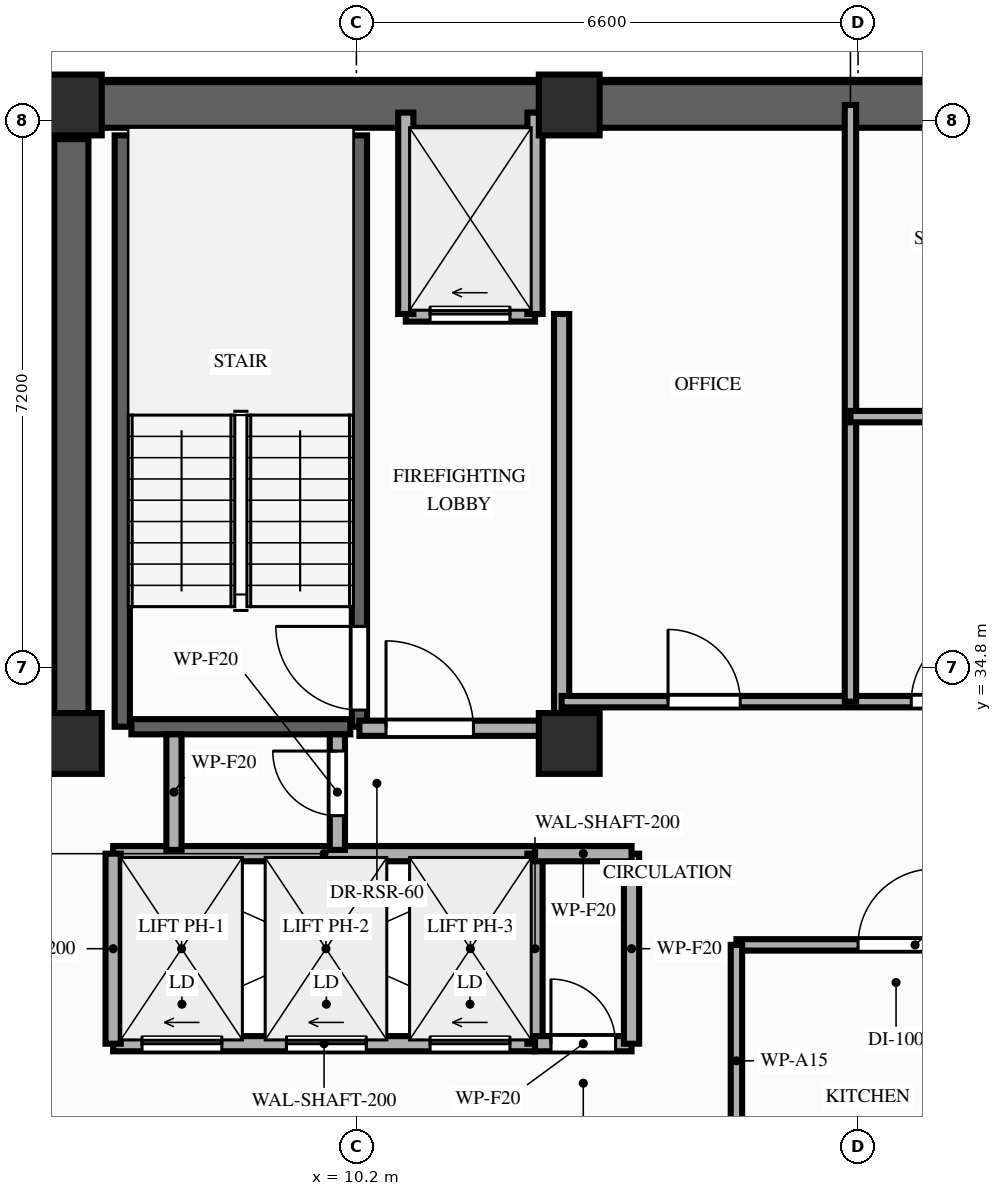
"""IFC4 building model, lengths in metres.
Left out: names, types, materials, properties, quantities, classifications, styles, units other than length and angle.
Written with IfcOpenShell. Run it as: python <this file> out.ifc"""

import sys

from ifc_helpers import new_model, si_unit, direction, frame, frame_2d, origin, origin_2d, place, context, subcontext, project, spatial, rectangle, extrude, element, fill, save


model = new_model("IFC4")
c1 = context("Model", 3, precision=1e-05, world=origin(), true_north=direction((0.0, 1.0)))
c2 = subcontext(c1, "Body", "Model", "MODEL_VIEW")
j1 = project(units=[si_unit("LENGTHUNIT", "METRE"), si_unit("PLANEANGLEUNIT", "RADIAN")], contexts=[c1])
p1 = place(None, origin())
s1 = spatial("IfcSite", under=j1, at=p1, CompositionType="ELEMENT")
p2 = place(p1, origin())
s2 = spatial("IfcBuilding", under=s1, at=p2, CompositionType="ELEMENT")
p3 = place(p2, frame((0.0, 0.0, 218.4)))
s3 = spatial("IfcBuildingStorey", under=s2, at=p3, CompositionType="ELEMENT", Elevation=218.4)
for number, where, z_axis, x_axis in (
    (1, (6.45, 33.8, 0.0), (0.0, 0.0, 1.0), (1.0, 0.0, 0.0)),
    (2, (13.0, 33.8, 0.0), (0.0, 0.0, 1.0), (1.0, 0.0, 0.0)),
    (3, (6.45, 42.2, 0.0), (0.0, 0.0, 1.0), (1.0, 0.0, 0.0)),
    (4, (13.0, 42.2, 0.0), (0.0, 0.0, 1.0), (1.0, 0.0, 0.0)),
):
    element("IfcColumn", number, at=place(p3, frame(where, z_axis=z_axis, x_axis=x_axis)), inside=s3, PredefinedType="COLUMN", context=c2, shape_type="SweptSolid", body=[
        extrude(rectangle(XDim=0.8, YDim=0.8, at=origin_2d()), origin(), (0.0, 0.0, 1.0), 3.2),
    ])
p4 = place(p3, frame((6.45, 42.2, 0.0), z_axis=(0.0, 0.0, 1.0), x_axis=(1.0, 0.0, 0.0)))
e5 = element("IfcWall", 5, at=p4, inside=s3, PredefinedType="SHEAR", context=c2, shape_type="SweptSolid", body=[
    extrude(rectangle(XDim=20.45, YDim=0.6, at=frame_2d((10.225, 0.0))), origin(), (0.0, 0.0, 1.0), 3.02),
])
p5 = place(p3, frame((6.45, 33.8, 0.0), z_axis=(0.0, 0.0, 1.0), x_axis=(0.0, 1.0, 0.0)))
e6 = element("IfcWall", 6, at=p5, inside=s3, PredefinedType="SHEAR", context=c2, shape_type="SweptSolid", body=[
    extrude(rectangle(XDim=7.95, YDim=0.45, at=frame_2d((3.975, 0.0))), origin(), (0.0, 0.0, 1.0), 3.02),
])
p6 = place(p3, frame((7.12, 34.02, 0.0), z_axis=(0.0, 0.0, 1.0), x_axis=(0.0, 1.0, 0.0)))
e7 = element("IfcWall", 7, at=p6, inside=s3, PredefinedType="SHEAR", context=c2, shape_type="SweptSolid", body=[
    extrude(rectangle(XDim=7.78, YDim=0.2, at=frame_2d((3.89, 0.0))), origin(), (0.0, 0.0, 1.0), 3.02),
])
p7 = place(p3, frame((10.24, 34.02, 0.0), z_axis=(0.0, 0.0, 1.0), x_axis=(0.0, 1.0, 0.0)))
e8 = element("IfcWall", 8, at=p7, inside=s3, PredefinedType="SHEAR", context=c2, shape_type="SweptSolid", body=[
    extrude(rectangle(XDim=7.78, YDim=0.2, at=frame_2d((3.89, 0.0))), origin(), (0.0, 0.0, 1.0), 3.02),
])
p8 = place(p7, frame((0.22, 0.0, 0.0)))
e9 = element("IfcOpeningElement", 9, at=p8, cuts=e8, PredefinedType="OPENING", context=c2, shape_type="SweptSolid", body=[
    extrude(rectangle(XDim=1.1, YDim=2.15, at=frame_2d((0.55, 1.075))), frame((0.0, 0.11, 0.0), z_axis=(0.0, -1.0, 0.0), x_axis=(1.0, 0.0, 0.0)), (0.0, 0.0, 1.0), 0.22),
])
p9 = place(p3, frame((7.24, 34.02, 0.0), z_axis=(0.0, 0.0, 1.0), x_axis=(1.0, 0.0, 0.0)))
e10 = element("IfcWall", 10, at=p9, inside=s3, PredefinedType="SHEAR", context=c2, shape_type="SweptSolid", body=[
    extrude(rectangle(XDim=2.88, YDim=0.2, at=frame_2d((1.44, 0.0))), origin(), (0.0, 0.0, 1.0), 3.02),
])
p10 = place(p3, frame((7.0, 29.85, 0.0), z_axis=(0.0, 0.0, 1.0), x_axis=(1.0, 0.0, 0.0)))
e11 = element("IfcWall", 11, at=p10, inside=s3, PredefinedType="MOVABLE", context=c2, shape_type="SweptSolid", body=[
    extrude(rectangle(XDim=5.55, YDim=0.2, at=frame_2d((2.775, 0.0))), origin(), (0.0, 0.0, 1.0), 3.02),
])
p11 = place(p10, frame((0.38, 0.0, 0.0)))
e12 = element("IfcOpeningElement", 12, at=p11, cuts=e11, PredefinedType="OPENING", context=c2, shape_type="SweptSolid", body=[
    extrude(rectangle(XDim=1.05, YDim=2.15, at=frame_2d((0.525, 1.075))), frame((0.0, 0.11, 0.0), z_axis=(0.0, -1.0, 0.0), x_axis=(1.0, 0.0, 0.0)), (0.0, 0.0, 1.0), 0.22),
])
p12 = place(p10, frame((2.28, 0.0, 0.0)))
e13 = element("IfcOpeningElement", 13, at=p12, cuts=e11, PredefinedType="OPENING", context=c2, shape_type="SweptSolid", body=[
    extrude(rectangle(XDim=1.05, YDim=2.15, at=frame_2d((0.525, 1.075))), frame((0.0, 0.11, 0.0), z_axis=(0.0, -1.0, 0.0), x_axis=(1.0, 0.0, 0.0)), (0.0, 0.0, 1.0), 0.22),
])
p13 = place(p10, frame((4.17, 0.0, 0.0)))
e14 = element("IfcOpeningElement", 14, at=p13, cuts=e11, PredefinedType="OPENING", context=c2, shape_type="SweptSolid", body=[
    extrude(rectangle(XDim=1.05, YDim=2.15, at=frame_2d((0.525, 1.075))), frame((0.0, 0.11, 0.0), z_axis=(0.0, -1.0, 0.0), x_axis=(1.0, 0.0, 0.0)), (0.0, 0.0, 1.0), 0.22),
])
p14 = place(p3, frame((7.0, 32.35, 0.0), z_axis=(0.0, 0.0, 1.0), x_axis=(1.0, 0.0, 0.0)))
e15 = element("IfcWall", 15, at=p14, inside=s3, PredefinedType="MOVABLE", context=c2, shape_type="SweptSolid", body=[
    extrude(rectangle(XDim=5.55, YDim=0.2, at=frame_2d((2.775, 0.0))), origin(), (0.0, 0.0, 1.0), 3.02),
])
for number, where, z_axis, x_axis in (
    (16, (7.0, 29.85, 0.0), (0.0, 0.0, 1.0), (0.0, 1.0, 0.0)),
    (17, (12.55, 29.85, 0.0), (0.0, 0.0, 1.0), (0.0, 1.0, 0.0)),
):
    element("IfcWall", number, at=place(p3, frame(where, z_axis=z_axis, x_axis=x_axis)), inside=s3, PredefinedType="MOVABLE", context=c2, shape_type="SweptSolid", body=[
        extrude(rectangle(XDim=2.5, YDim=0.2, at=frame_2d((1.25, 0.0))), origin(), (0.0, 0.0, 1.0), 3.02),
    ])
p15 = place(p3, frame((10.85, 39.45, 0.0), z_axis=(0.0, 0.0, 1.0), x_axis=(1.0, 0.0, 0.0)))
e18 = element("IfcWall", 18, at=p15, inside=s3, PredefinedType="MOVABLE", context=c2, shape_type="SweptSolid", body=[
    extrude(rectangle(XDim=1.7, YDim=0.2, at=frame_2d((0.85, 0.0))), origin(), (0.0, 0.0, 1.0), 3.02),
])
p16 = place(p15, frame((0.32, 0.0, 0.0)))
e19 = element("IfcOpeningElement", 19, at=p16, cuts=e18, PredefinedType="OPENING", context=c2, shape_type="SweptSolid", body=[
    extrude(rectangle(XDim=1.05, YDim=2.15, at=frame_2d((0.525, 1.075))), frame((0.0, 0.11, 0.0), z_axis=(0.0, -1.0, 0.0), x_axis=(1.0, 0.0, 0.0)), (0.0, 0.0, 1.0), 0.22),
])
for number, where, z_axis, x_axis in (
    (20, (10.85, 39.45, 0.0), (0.0, 0.0, 1.0), (0.0, 1.0, 0.0)),
    (21, (12.55, 39.45, 0.0), (0.0, 0.0, 1.0), (0.0, 1.0, 0.0)),
):
    element("IfcWall", number, at=place(p3, frame(where, z_axis=z_axis, x_axis=x_axis)), inside=s3, PredefinedType="MOVABLE", context=c2, shape_type="SweptSolid", body=[
        extrude(rectangle(XDim=2.65, YDim=0.2, at=frame_2d((1.325, 0.0))), origin(), (0.0, 0.0, 1.0), 2.51),
    ])
p17 = place(p3, frame((12.9, 34.0, 0.0), z_axis=(0.0, 0.0, 1.0), x_axis=(0.0, 1.0, 0.0)))
e22 = element("IfcWall", 22, at=p17, inside=s3, PredefinedType="PARTITIONING", context=c2, shape_type="SweptSolid", body=[
    extrude(rectangle(XDim=5.45, YDim=0.2, at=frame_2d((2.725, 0.0))), origin(), (0.0, 0.0, 1.0), 2.51),
])
p18 = place(p3, frame((10.24, 34.0, 0.0), z_axis=(0.0, 0.0, 1.0), x_axis=(1.0, 0.0, 0.0)))
e23 = element("IfcWall", 23, at=p18, inside=s3, PredefinedType="PARTITIONING", context=c2, shape_type="SweptSolid", body=[
    extrude(rectangle(XDim=2.66, YDim=0.2, at=frame_2d((1.33, 0.0))), origin(), (0.0, 0.0, 1.0), 2.51),
])
p19 = place(p18, frame((0.35, 0.0, 0.0)))
e24 = element("IfcOpeningElement", 24, at=p19, cuts=e23, PredefinedType="OPENING", context=c2, shape_type="SweptSolid", body=[
    extrude(rectangle(XDim=1.15, YDim=2.15, at=frame_2d((0.575, 1.075))), frame((0.0, 0.11, 0.0), z_axis=(0.0, -1.0, 0.0), x_axis=(1.0, 0.0, 0.0)), (0.0, 0.0, 1.0), 0.22),
])
p20 = place(p3, frame((12.55, 29.85, 0.0), z_axis=(0.0, 0.0, 1.0), x_axis=(1.0, 0.0, 0.0)))
e25 = element("IfcWall", 25, at=p20, inside=s3, PredefinedType="PARTITIONING", context=c2, shape_type="SweptSolid", body=[
    extrude(rectangle(XDim=1.27, YDim=0.2, at=frame_2d((0.635, 0.0))), origin(), (0.0, 0.0, 1.0), 3.02),
])
p21 = place(p20, frame((0.21, 0.0, 0.0)))
e26 = element("IfcOpeningElement", 26, at=p21, cuts=e25, PredefinedType="OPENING", context=c2, shape_type="SweptSolid", body=[
    extrude(rectangle(XDim=0.85, YDim=2.05, at=frame_2d((0.425, 1.025))), frame((0.0, 0.11, 0.0), z_axis=(0.0, -1.0, 0.0), x_axis=(1.0, 0.0, 0.0)), (0.0, 0.0, 1.0), 0.22),
])
p22 = place(p3, frame((13.82, 29.85, 0.0), z_axis=(0.0, 0.0, 1.0), x_axis=(0.0, 1.0, 0.0)))
e27 = element("IfcWall", 27, at=p22, inside=s3, PredefinedType="PARTITIONING", context=c2, shape_type="SweptSolid", body=[
    extrude(rectangle(XDim=2.5, YDim=0.2, at=frame_2d((1.25, 0.0))), origin(), (0.0, 0.0, 1.0), 3.02),
])
p23 = place(p3, frame((12.55, 32.35, 0.0), z_axis=(0.0, 0.0, 1.0), x_axis=(1.0, 0.0, 0.0)))
e28 = element("IfcWall", 28, at=p23, inside=s3, PredefinedType="PARTITIONING", context=c2, shape_type="SweptSolid", body=[
    extrude(rectangle(XDim=1.27, YDim=0.2, at=frame_2d((0.635, 0.0))), origin(), (0.0, 0.0, 1.0), 3.02),
])
p24 = place(p3, frame((7.8, 32.4, 0.0), z_axis=(0.0, 0.0, 1.0), x_axis=(0.0, 1.0, 0.0)))
e29 = element("IfcWall", 29, at=p24, inside=s3, PredefinedType="PARTITIONING", context=c2, shape_type="SweptSolid", body=[
    extrude(rectangle(XDim=1.52, YDim=0.2, at=frame_2d((0.76, 0.0))), origin(), (0.0, 0.0, 1.0), 2.51),
])
p25 = place(p3, frame((9.95, 32.4, 0.0), z_axis=(0.0, 0.0, 1.0), x_axis=(0.0, 1.0, 0.0)))
e30 = element("IfcWall", 30, at=p25, inside=s3, PredefinedType="PARTITIONING", context=c2, shape_type="SweptSolid", body=[
    extrude(rectangle(XDim=1.52, YDim=0.2, at=frame_2d((0.76, 0.0))), origin(), (0.0, 0.0, 1.0), 2.51),
])
p26 = place(p25, frame((0.45, 0.0, 0.0)))
e31 = element("IfcOpeningElement", 31, at=p26, cuts=e30, PredefinedType="OPENING", context=c2, shape_type="SweptSolid", body=[
    extrude(rectangle(XDim=0.85, YDim=2.05, at=frame_2d((0.425, 1.025))), frame((0.0, 0.11, 0.0), z_axis=(0.0, -1.0, 0.0), x_axis=(1.0, 0.0, 0.0)), (0.0, 0.0, 1.0), 0.22),
])
p27 = place(p3, frame((12.9, 34.35, 0.0), z_axis=(0.0, 0.0, 1.0), x_axis=(1.0, 0.0, 0.0)))
e32 = element("IfcWall", 32, at=p27, inside=s3, PredefinedType="PARTITIONING", context=c2, shape_type="SweptSolid", body=[
    extrude(rectangle(XDim=7.6, YDim=0.15, at=frame_2d((3.8, 0.0))), origin(), (0.0, 0.0, 1.0), 3.02),
])
p28 = place(p27, frame((1.4, 0.0, 0.0)))
e33 = element("IfcOpeningElement", 33, at=p28, cuts=e32, PredefinedType="OPENING", context=c2, shape_type="SweptSolid", body=[
    extrude(rectangle(XDim=0.95, YDim=2.15, at=frame_2d((0.475, 1.075))), frame((0.0, 0.085, 0.0), z_axis=(0.0, -1.0, 0.0), x_axis=(1.0, 0.0, 0.0)), (0.0, 0.0, 1.0), 0.17),
])
p29 = place(p27, frame((4.6, 0.0, 0.0)))
e34 = element("IfcOpeningElement", 34, at=p29, cuts=e32, PredefinedType="OPENING", context=c2, shape_type="SweptSolid", body=[
    extrude(rectangle(XDim=0.95, YDim=2.15, at=frame_2d((0.475, 1.075))), frame((0.0, 0.085, 0.0), z_axis=(0.0, -1.0, 0.0), x_axis=(1.0, 0.0, 0.0)), (0.0, 0.0, 1.0), 0.17),
])
p30 = place(p3, frame((16.7, 34.35, 0.0), z_axis=(0.0, 0.0, 1.0), x_axis=(0.0, 1.0, 0.0)))
e35 = element("IfcWall", 35, at=p30, inside=s3, PredefinedType="PARTITIONING", context=c2, shape_type="SweptSolid", body=[
    extrude(rectangle(XDim=7.85, YDim=0.15, at=frame_2d((3.925, 0.0))), origin(), (0.0, 0.0, 1.0), 2.51),
])
p31 = place(p3, frame((16.7, 38.1, 0.0), z_axis=(0.0, 0.0, 1.0), x_axis=(1.0, 0.0, 0.0)))
e36 = element("IfcWall", 36, at=p31, inside=s3, PredefinedType="PARTITIONING", context=c2, shape_type="SweptSolid", body=[
    extrude(rectangle(XDim=3.75, YDim=0.15, at=frame_2d((1.875, 0.0))), origin(), (0.0, 0.0, 1.0), 3.02),
])
p32 = place(p31, frame((1.45, 0.0, 0.0)))
e37 = element("IfcOpeningElement", 37, at=p32, cuts=e36, PredefinedType="OPENING", context=c2, shape_type="SweptSolid", body=[
    extrude(rectangle(XDim=0.85, YDim=2.05, at=frame_2d((0.425, 1.025))), frame((0.0, 0.085, 0.0), z_axis=(0.0, -1.0, 0.0), x_axis=(1.0, 0.0, 0.0)), (0.0, 0.0, 1.0), 0.17),
])
p33 = place(p3, frame((15.2, 31.15, 0.0), z_axis=(0.0, 0.0, 1.0), x_axis=(1.0, 0.0, 0.0)))
e38 = element("IfcWall", 38, at=p33, inside=s3, PredefinedType="PARTITIONING", context=c2, shape_type="SweptSolid", body=[
    extrude(rectangle(XDim=4.7, YDim=0.15, at=frame_2d((2.35, 0.0))), origin(), (0.0, 0.0, 1.0), 2.51),
])
p34 = place(p33, frame((1.6, 0.0, 0.0)))
e39 = element("IfcOpeningElement", 39, at=p34, cuts=e38, PredefinedType="OPENING", context=c2, shape_type="SweptSolid", body=[
    extrude(rectangle(XDim=1.0, YDim=2.15, at=frame_2d((0.5, 1.075))), frame((0.0, 0.085, 0.0), z_axis=(0.0, -1.0, 0.0), x_axis=(1.0, 0.0, 0.0)), (0.0, 0.0, 1.0), 0.17),
])
p35 = place(p3, frame((15.2, 28.1, 0.0), z_axis=(0.0, 0.0, 1.0), x_axis=(0.0, 1.0, 0.0)))
e40 = element("IfcWall", 40, at=p35, inside=s3, PredefinedType="PARTITIONING", context=c2, shape_type="SweptSolid", body=[
    extrude(rectangle(XDim=3.05, YDim=0.15, at=frame_2d((1.525, 0.0))), origin(), (0.0, 0.0, 1.0), 2.51),
])
p36 = place(p8, origin())
e41 = element("IfcDoor", 41, at=p36, inside=s3, OperationType="SINGLE_SWING_RIGHT", PredefinedType="DOOR", context=c2, shape_type="SweptSolid", body=[
    extrude(rectangle(XDim=1.1, YDim=2.15, at=frame_2d((0.55, 1.075))), frame((0.0, 0.025, 0.0), z_axis=(0.0, -1.0, 0.0), x_axis=(1.0, 0.0, 0.0)), (0.0, 0.0, 1.0), 0.05),
])
fill(e9, e41)
p37 = place(p11, origin())
e42 = element("IfcDoor", 42, at=p37, inside=s3, OperationType="SLIDING_TO_LEFT", PredefinedType="DOOR", context=c2, shape_type="SweptSolid", body=[
    extrude(rectangle(XDim=1.05, YDim=2.15, at=frame_2d((0.525, 1.075))), frame((0.0, 0.025, 0.0), z_axis=(0.0, -1.0, 0.0), x_axis=(1.0, 0.0, 0.0)), (0.0, 0.0, 1.0), 0.05),
])
fill(e12, e42)
p38 = place(p12, origin())
e43 = element("IfcDoor", 43, at=p38, inside=s3, OperationType="SLIDING_TO_LEFT", PredefinedType="DOOR", context=c2, shape_type="SweptSolid", body=[
    extrude(rectangle(XDim=1.05, YDim=2.15, at=frame_2d((0.525, 1.075))), frame((0.0, 0.025, 0.0), z_axis=(0.0, -1.0, 0.0), x_axis=(1.0, 0.0, 0.0)), (0.0, 0.0, 1.0), 0.05),
])
fill(e13, e43)
p39 = place(p13, origin())
e44 = element("IfcDoor", 44, at=p39, inside=s3, OperationType="SLIDING_TO_LEFT", PredefinedType="DOOR", context=c2, shape_type="SweptSolid", body=[
    extrude(rectangle(XDim=1.05, YDim=2.15, at=frame_2d((0.525, 1.075))), frame((0.0, 0.025, 0.0), z_axis=(0.0, -1.0, 0.0), x_axis=(1.0, 0.0, 0.0)), (0.0, 0.0, 1.0), 0.05),
])
fill(e14, e44)
p40 = place(p16, origin())
e45 = element("IfcDoor", 45, at=p40, inside=s3, OperationType="SLIDING_TO_LEFT", PredefinedType="DOOR", context=c2, shape_type="SweptSolid", body=[
    extrude(rectangle(XDim=1.05, YDim=2.15, at=frame_2d((0.525, 1.075))), frame((0.0, 0.025, 0.0), z_axis=(0.0, -1.0, 0.0), x_axis=(1.0, 0.0, 0.0)), (0.0, 0.0, 1.0), 0.05),
])
fill(e19, e45)
p41 = place(p19, origin())
e46 = element("IfcDoor", 46, at=p41, inside=s3, OperationType="SINGLE_SWING_LEFT", PredefinedType="DOOR", context=c2, shape_type="SweptSolid", body=[
    extrude(rectangle(XDim=1.15, YDim=2.15, at=frame_2d((0.575, 1.075))), frame((0.0, 0.025, 0.0), z_axis=(0.0, -1.0, 0.0), x_axis=(1.0, 0.0, 0.0)), (0.0, 0.0, 1.0), 0.05),
])
fill(e24, e46)
p42 = place(p21, origin())
e47 = element("IfcDoor", 47, at=p42, inside=s3, OperationType="SINGLE_SWING_LEFT", PredefinedType="DOOR", context=c2, shape_type="SweptSolid", body=[
    extrude(rectangle(XDim=0.85, YDim=2.05, at=frame_2d((0.425, 1.025))), frame((0.0, 0.025, 0.0), z_axis=(0.0, -1.0, 0.0), x_axis=(1.0, 0.0, 0.0)), (0.0, 0.0, 1.0), 0.05),
])
fill(e26, e47)
p43 = place(p26, origin())
e48 = element("IfcDoor", 48, at=p43, inside=s3, OperationType="SINGLE_SWING_RIGHT", PredefinedType="DOOR", context=c2, shape_type="SweptSolid", body=[
    extrude(rectangle(XDim=0.85, YDim=2.05, at=frame_2d((0.425, 1.025))), frame((0.0, 0.025, 0.0), z_axis=(0.0, -1.0, 0.0), x_axis=(1.0, 0.0, 0.0)), (0.0, 0.0, 1.0), 0.05),
])
fill(e31, e48)
p44 = place(p28, origin())
e49 = element("IfcDoor", 49, at=p44, inside=s3, OperationType="SINGLE_SWING_LEFT", PredefinedType="DOOR", context=c2, shape_type="SweptSolid", body=[
    extrude(rectangle(XDim=0.95, YDim=2.15, at=frame_2d((0.475, 1.075))), frame((0.0, 0.025, 0.0), z_axis=(0.0, -1.0, 0.0), x_axis=(1.0, 0.0, 0.0)), (0.0, 0.0, 1.0), 0.05),
])
fill(e33, e49)
p45 = place(p29, origin())
e50 = element("IfcDoor", 50, at=p45, inside=s3, OperationType="SINGLE_SWING_RIGHT", PredefinedType="DOOR", context=c2, shape_type="SweptSolid", body=[
    extrude(rectangle(XDim=0.95, YDim=2.15, at=frame_2d((0.475, 1.075))), frame((0.0, 0.025, 0.0), z_axis=(0.0, -1.0, 0.0), x_axis=(1.0, 0.0, 0.0)), (0.0, 0.0, 1.0), 0.05),
])
fill(e34, e50)
p46 = place(p34, origin())
e51 = element("IfcDoor", 51, at=p46, inside=s3, OperationType="SINGLE_SWING_RIGHT", PredefinedType="DOOR", context=c2, shape_type="SweptSolid", body=[
    extrude(rectangle(XDim=1.0, YDim=2.15, at=frame_2d((0.5, 1.075))), frame((0.0, 0.025, 0.0), z_axis=(0.0, -1.0, 0.0), x_axis=(1.0, 0.0, 0.0)), (0.0, 0.0, 1.0), 0.05),
])
fill(e39, e51)
save(model, sys.argv[1])
